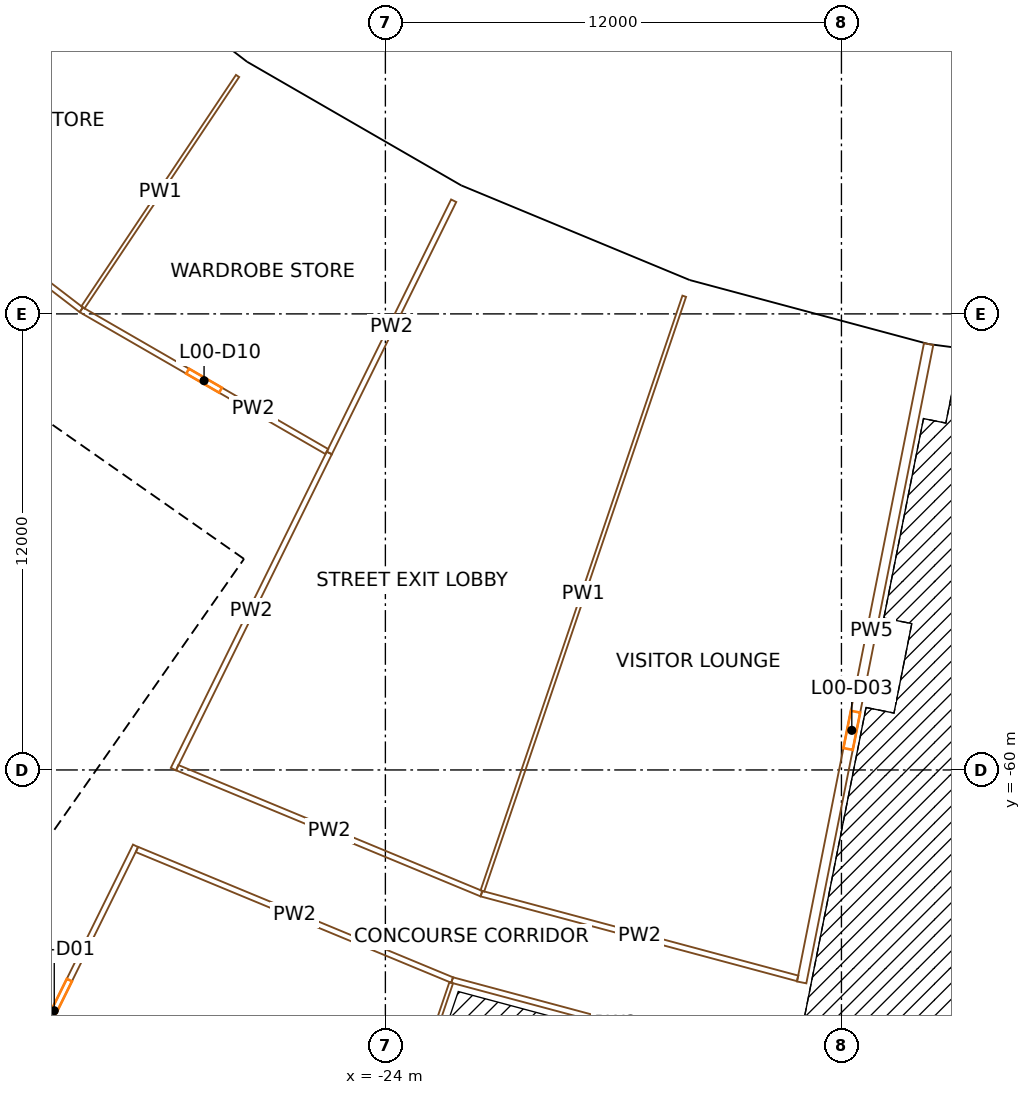
"""IFC4 building model, lengths in metres.
Left out: names, types, materials, properties, quantities, classifications, styles, units other than length and angle.
Written with IfcOpenShell. Run it as: python <this file> out.ifc"""

import sys

from ifc_helpers import new_model, si_unit, direction, frame, frame_2d, origin, origin_2d, place, context, subcontext, project, spatial, rectangle, extrude, element, fill, save


model = new_model("IFC4")
c1 = context("Model", 3, precision=1e-05, world=origin(), true_north=direction((0.0, 1.0)))
c2 = subcontext(c1, "Body", "Model", "MODEL_VIEW")
j1 = project(units=[si_unit("LENGTHUNIT", "METRE"), si_unit("PLANEANGLEUNIT", "RADIAN")], contexts=[c1])
p1 = place(None, origin())
s1 = spatial("IfcSite", under=j1, at=p1, CompositionType="ELEMENT")
p2 = place(p1, origin())
s2 = spatial("IfcBuilding", under=s1, at=p2, CompositionType="ELEMENT")
p3 = place(p2, origin())
s3 = spatial("IfcBuildingStorey", under=s2, at=p3, CompositionType="ELEMENT", Elevation=0.0)
p4 = place(p3, frame((-28.195, -42.197, -0.4), z_axis=(0.0, 0.0, 1.0), x_axis=(0.831469612303, -0.55557023302, 0.0)))
e1 = element("IfcColumn", 1, at=p4, inside=s3, PredefinedType="COLUMN", context=c2, shape_type="SweptSolid", body=[
    extrude(rectangle(XDim=1.1, YDim=1.3, at=origin_2d()), origin(), (0.0, 0.0, 1.0), 9.4),
])
p5 = place(p3, frame((-32.362, -48.433, -0.4), z_axis=(0.0, 0.0, 1.0), x_axis=(0.831469612303, -0.55557023302, 0.0)))
e2 = element("IfcColumn", 2, at=p5, inside=s3, PredefinedType="COLUMN", context=c2, shape_type="SweptSolid", body=[
    extrude(rectangle(XDim=1.4, YDim=1.8, at=origin_2d()), origin(), (0.0, 0.0, 1.0), 9.4),
])
p6 = place(p3, frame((-22.446, -45.516, -0.4), z_axis=(0.0, 0.0, 1.0), x_axis=(0.896872741533, -0.442288690219, 0.0)))
e3 = element("IfcColumn", 3, at=p6, inside=s3, PredefinedType="COLUMN", context=c2, shape_type="SweptSolid", body=[
    extrude(rectangle(XDim=1.1, YDim=1.3, at=origin_2d()), origin(), (0.0, 0.0, 1.0), 9.4),
])
p7 = place(p3, frame((-25.763, -52.243, -0.4), z_axis=(0.0, 0.0, 1.0), x_axis=(0.896872741533, -0.442288690219, 0.0)))
e4 = element("IfcColumn", 4, at=p7, inside=s3, PredefinedType="COLUMN", context=c2, shape_type="SweptSolid", body=[
    extrude(rectangle(XDim=1.4, YDim=1.8, at=origin_2d()), origin(), (0.0, 0.0, 1.0), 9.4),
])
p8 = place(p3, frame((-16.313, -48.057, -0.4), z_axis=(0.0, 0.0, 1.0), x_axis=(0.946930129495, -0.321439465303, 0.0)))
e5 = element("IfcColumn", 5, at=p8, inside=s3, PredefinedType="COLUMN", context=c2, shape_type="SweptSolid", body=[
    extrude(rectangle(XDim=1.1, YDim=1.3, at=origin_2d()), origin(), (0.0, 0.0, 1.0), 9.4),
])
p9 = place(p3, frame((-18.724, -55.159, -0.4), z_axis=(0.0, 0.0, 1.0), x_axis=(0.946930129495, -0.321439465303, 0.0)))
e6 = element("IfcColumn", 6, at=p9, inside=s3, PredefinedType="COLUMN", context=c2, shape_type="SweptSolid", body=[
    extrude(rectangle(XDim=1.4, YDim=1.8, at=origin_2d()), origin(), (0.0, 0.0, 1.0), 9.4),
])
p10 = place(p3, frame((-9.901, -49.775, -0.4), z_axis=(0.0, 0.0, 1.0), x_axis=(0.980785280403, -0.195090322016, 0.0)))
e7 = element("IfcColumn", 7, at=p10, inside=s3, PredefinedType="COLUMN", context=c2, shape_type="SweptSolid", body=[
    extrude(rectangle(XDim=1.1, YDim=1.3, at=origin_2d()), origin(), (0.0, 0.0, 1.0), 9.4),
])
p11 = place(p3, frame((-11.364, -57.131, -0.4), z_axis=(0.0, 0.0, 1.0), x_axis=(0.980785280403, -0.195090322016, 0.0)))
e8 = element("IfcColumn", 8, at=p11, inside=s3, PredefinedType="COLUMN", context=c2, shape_type="SweptSolid", body=[
    extrude(rectangle(XDim=1.4, YDim=1.8, at=origin_2d()), origin(), (0.0, 0.0, 1.0), 9.4),
])
p12 = place(p3, frame((-36.717, -66.337, 0.0), z_axis=(0.0, 0.0, 1.0), x_axis=(0.573577477574, 0.819151315216, 0.0)))
e9 = element("IfcWall", 9, at=p12, inside=s3, PredefinedType="SHEAR", context=c2, shape_type="SweptSolid", body=[
    extrude(rectangle(XDim=14.8, YDim=0.9, at=frame_2d((7.4, 0.0))), origin(), (0.0, 0.0, 1.0), 8.6),
])
p13 = place(p12, frame((6.2, 0.0, 0.0)))
e10 = element("IfcOpeningElement", 10, at=p13, cuts=e9, PredefinedType="OPENING", context=c2, shape_type="SweptSolid", body=[
    extrude(rectangle(XDim=2.4, YDim=2.1, at=frame_2d((1.2, 1.05))), frame((0.0, 0.46, 0.0), z_axis=(0.0, -1.0, 0.0), x_axis=(1.0, 0.0, 0.0)), (0.0, 0.0, 1.0), 0.92),
])
p14 = place(p3, frame((-28.854, -54.324, 0.0), z_axis=(0.0, 0.0, 1.0), x_axis=(-0.819145767589, 0.573585400304, 0.0)))
e11 = element("IfcWall", 11, at=p14, inside=s3, PredefinedType="SHEAR", context=c2, shape_type="SweptSolid", body=[
    extrude(rectangle(XDim=15.045, YDim=0.9, at=frame_2d((7.523, 0.0))), origin(), (0.0, 0.0, 1.0), 8.6),
])
p15 = place(p14, frame((0.85, 0.0, 0.0)))
e12 = element("IfcOpeningElement", 12, at=p15, cuts=e11, PredefinedType="OPENING", context=c2, shape_type="SweptSolid", body=[
    extrude(rectangle(XDim=1.0, YDim=2.1, at=frame_2d((0.5, 1.05))), frame((0.0, 0.46, 0.0), z_axis=(0.0, -1.0, 0.0), x_axis=(1.0, 0.0, 0.0)), (0.0, 0.0, 1.0), 0.92),
])
p16 = place(p14, frame((3.575, 0.0, 0.0)))
e13 = element("IfcOpeningElement", 13, at=p16, cuts=e11, PredefinedType="OPENING", context=c2, shape_type="SweptSolid", body=[
    extrude(rectangle(XDim=1.0, YDim=2.1, at=frame_2d((0.5, 1.05))), frame((0.0, 0.46, 0.0), z_axis=(0.0, -1.0, 0.0), x_axis=(1.0, 0.0, 0.0)), (0.0, 0.0, 1.0), 0.92),
])
p17 = place(p14, frame((6.275, 0.0, 0.0)))
e14 = element("IfcOpeningElement", 14, at=p17, cuts=e11, PredefinedType="OPENING", context=c2, shape_type="SweptSolid", body=[
    extrude(rectangle(XDim=0.9, YDim=2.1, at=frame_2d((0.45, 1.05))), frame((0.0, 0.46, 0.0), z_axis=(0.0, -1.0, 0.0), x_axis=(1.0, 0.0, 0.0)), (0.0, 0.0, 1.0), 0.92),
])
p18 = place(p14, frame((13.495, 0.0, 0.0)))
e15 = element("IfcOpeningElement", 15, at=p18, cuts=e11, PredefinedType="OPENING", context=c2, shape_type="SweptSolid", body=[
    extrude(rectangle(XDim=1.1, YDim=2.1, at=frame_2d((0.55, 1.05))), frame((0.0, 0.46, 0.0), z_axis=(0.0, -1.0, 0.0), x_axis=(1.0, 0.0, 0.0)), (0.0, 0.0, 1.0), 0.92),
])
p19 = place(p3, frame((-31.895, -58.666, 0.0), z_axis=(0.0, 0.0, 1.0), x_axis=(-0.819166993208, 0.573555086491, 0.0)))
e16 = element("IfcWall", 16, at=p19, inside=s3, PredefinedType="SOLIDWALL", context=c2, shape_type="SweptSolid", body=[
    extrude(rectangle(XDim=7.95, YDim=0.3, at=frame_2d((3.975, 0.0))), origin(), (0.0, 0.0, 1.0), 8.6),
])
p20 = place(p19, frame((0.675, 0.0, 0.0)))
e17 = element("IfcOpeningElement", 17, at=p20, cuts=e16, PredefinedType="OPENING", context=c2, shape_type="SweptSolid", body=[
    extrude(rectangle(XDim=1.1, YDim=2.1, at=frame_2d((0.55, 1.05))), frame((0.0, 0.16, 0.0), z_axis=(0.0, -1.0, 0.0), x_axis=(1.0, 0.0, 0.0)), (0.0, 0.0, 1.0), 0.32),
])
p21 = place(p19, frame((3.425, 0.0, 0.0)))
e18 = element("IfcOpeningElement", 18, at=p21, cuts=e16, PredefinedType="OPENING", context=c2, shape_type="SweptSolid", body=[
    extrude(rectangle(XDim=1.1, YDim=2.1, at=frame_2d((0.55, 1.05))), frame((0.0, 0.16, 0.0), z_axis=(0.0, -1.0, 0.0), x_axis=(1.0, 0.0, 0.0)), (0.0, 0.0, 1.0), 0.32),
])
p22 = place(p19, frame((6.175, 0.0, 0.0)))
e19 = element("IfcOpeningElement", 19, at=p22, cuts=e16, PredefinedType="OPENING", context=c2, shape_type="SweptSolid", body=[
    extrude(rectangle(XDim=1.1, YDim=2.1, at=frame_2d((0.55, 1.05))), frame((0.0, 0.16, 0.0), z_axis=(0.0, -1.0, 0.0), x_axis=(1.0, 0.0, 0.0)), (0.0, 0.0, 1.0), 0.32),
])
p23 = place(p3, frame((-30.461, -56.618, 0.0), z_axis=(0.0, 0.0, 1.0), x_axis=(-0.819142461705, 0.573590121456, 0.0)))
e20 = element("IfcWall", 20, at=p23, inside=s3, PredefinedType="SOLIDWALL", context=c2, shape_type="SweptSolid", body=[
    extrude(rectangle(XDim=7.95, YDim=0.3, at=frame_2d((3.975, 0.0))), origin(), (0.0, 0.0, 1.0), 8.6),
])
p24 = place(p3, frame((-33.938, -57.052, 0.0), z_axis=(0.0, 0.0, 1.0), x_axis=(0.573581496053, 0.819148501424, 0.0)))
e21 = element("IfcWall", 21, at=p24, inside=s3, PredefinedType="SOLIDWALL", context=c2, shape_type="SweptSolid", body=[
    extrude(rectangle(XDim=2.2, YDim=0.3, at=frame_2d((1.1, 0.0))), origin(), (0.0, 0.0, 1.0), 8.6),
])
p25 = place(p3, frame((-32.627, -54.917, 0.0), z_axis=(0.0, 0.0, 1.0), x_axis=(0.573507030513, 0.819200638399, 0.0)))
e22 = element("IfcWall", 22, at=p25, inside=s3, PredefinedType="PARTITIONING", context=c2, shape_type="SweptSolid", body=[
    extrude(rectangle(XDim=2.2, YDim=0.15, at=frame_2d((1.1, 0.0))), origin(), (0.0, 0.0, 1.0), 8.6),
])
p26 = place(p3, frame((-27.741, -41.571, 0.0), z_axis=(0.0, 0.0, 1.0), x_axis=(-0.793338838284, 0.608780327927, 0.0)))
e23 = element("IfcWall", 23, at=p26, inside=s3, PredefinedType="SOLIDWALL", context=c2, shape_type="SweptSolid", body=[
    extrude(rectangle(XDim=6.597, YDim=0.45, at=frame_2d((3.298, 0.0))), origin(), (0.0, 0.0, 1.0), 7.7),
])
p27 = place(p26, frame((2.398, 0.0, 0.0)))
e24 = element("IfcOpeningElement", 24, at=p27, cuts=e23, PredefinedType="OPENING", context=c2, shape_type="SweptSolid", body=[
    extrude(rectangle(XDim=1.8, YDim=2.4, at=frame_2d((0.9, 1.2))), frame((0.0, 0.235, 0.0), z_axis=(0.0, -1.0, 0.0), x_axis=(1.0, 0.0, 0.0)), (0.0, 0.0, 1.0), 0.47),
])
p28 = place(p3, frame((-22.155, -44.792, 0.0), z_axis=(0.0, 0.0, 1.0), x_axis=(-0.866022817921, 0.50000447882, 0.0)))
e25 = element("IfcWall", 25, at=p28, inside=s3, PredefinedType="SOLIDWALL", context=c2, shape_type="SweptSolid", body=[
    extrude(rectangle(XDim=6.419, YDim=0.45, at=frame_2d((3.21, 0.0))), origin(), (0.0, 0.0, 1.0), 7.7),
])
p29 = place(p3, frame((-16.078, -47.318, 0.0), z_axis=(0.0, 0.0, 1.0), x_axis=(-0.923877418118, 0.382688536921, 0.0)))
e26 = element("IfcWall", 26, at=p29, inside=s3, PredefinedType="SOLIDWALL", context=c2, shape_type="SweptSolid", body=[
    extrude(rectangle(XDim=6.552, YDim=0.45, at=frame_2d((3.276, 0.0))), origin(), (0.0, 0.0, 1.0), 7.7),
])
p30 = place(p29, frame((2.354, 0.0, 0.0)))
e27 = element("IfcOpeningElement", 27, at=p30, cuts=e26, PredefinedType="OPENING", context=c2, shape_type="SweptSolid", body=[
    extrude(rectangle(XDim=1.8, YDim=2.4, at=frame_2d((0.9, 1.2))), frame((0.0, 0.235, 0.0), z_axis=(0.0, -1.0, 0.0), x_axis=(1.0, 0.0, 0.0)), (0.0, 0.0, 1.0), 0.47),
])
p31 = place(p3, frame((-37.919, -43.352, 0.0), z_axis=(0.0, 0.0, 1.0), x_axis=(0.793353438114, -0.608761301523, 0.0)))
e28 = element("IfcWall", 28, at=p31, inside=s3, PredefinedType="PARTITIONING", context=c2, shape_type="SweptSolid", body=[
    extrude(rectangle(XDim=7.459, YDim=0.15, at=frame_2d((3.73, 0.0))), origin(), (0.0, 0.0, 1.0), 7.6),
])
p32 = place(p3, frame((-32.001, -47.893, 0.0), z_axis=(0.0, 0.0, 1.0), x_axis=(0.866020983744, -0.500007655656, 0.0)))
e29 = element("IfcWall", 29, at=p32, inside=s3, PredefinedType="PARTITIONING", context=c2, shape_type="SweptSolid", body=[
    extrude(rectangle(XDim=7.459, YDim=0.15, at=frame_2d((3.73, 0.0))), origin(), (0.0, 0.0, 1.0), 7.6),
])
p33 = place(p32, frame((3.23, 0.0, 0.0)))
e30 = element("IfcOpeningElement", 30, at=p33, cuts=e29, PredefinedType="OPENING", context=c2, shape_type="SweptSolid", body=[
    extrude(rectangle(XDim=1.0, YDim=2.1, at=frame_2d((0.5, 1.05))), frame((0.0, 0.085, 0.0), z_axis=(0.0, -1.0, 0.0), x_axis=(1.0, 0.0, 0.0)), (0.0, 0.0, 1.0), 0.17),
])
p34 = place(p3, frame((-30.573, -61.996, 0.0), z_axis=(0.0, 0.0, 1.0), x_axis=(-0.442281083907, -0.89687649251, 0.0)))
e31 = element("IfcWall", 31, at=p34, inside=s3, PredefinedType="PARTITIONING", context=c2, shape_type="SweptSolid", body=[
    extrude(rectangle(XDim=9.675, YDim=0.15, at=frame_2d((4.837, 0.0))), origin(), (0.0, 0.0, 1.0), 7.6),
])
p35 = place(p34, frame((3.938, 0.0, 0.0)))
e32 = element("IfcOpeningElement", 32, at=p35, cuts=e31, PredefinedType="OPENING", context=c2, shape_type="SweptSolid", body=[
    extrude(rectangle(XDim=1.8, YDim=2.1, at=frame_2d((0.9, 1.05))), frame((0.0, 0.085, 0.0), z_axis=(0.0, -1.0, 0.0), x_axis=(1.0, 0.0, 0.0)), (0.0, 0.0, 1.0), 0.17),
])
p36 = place(p3, frame((-30.537, -62.092, 0.0), z_axis=(0.0, 0.0, 1.0), x_axis=(0.923877943186, -0.382687269313, 0.0)))
e33 = element("IfcWall", 33, at=p36, inside=s3, PredefinedType="PARTITIONING", context=c2, shape_type="SweptSolid", body=[
    extrude(rectangle(XDim=8.977, YDim=0.15, at=frame_2d((4.488, 0.0))), origin(), (0.0, 0.0, 1.0), 7.6),
])
p37 = place(p3, frame((-29.476, -59.94, 0.0), z_axis=(0.0, 0.0, 1.0), x_axis=(0.923877031545, -0.382689470177, 0.0)))
e34 = element("IfcWall", 34, at=p37, inside=s3, PredefinedType="PARTITIONING", context=c2, shape_type="SweptSolid", body=[
    extrude(rectangle(XDim=8.663, YDim=0.15, at=frame_2d((4.332, 0.0))), origin(), (0.0, 0.0, 1.0), 7.6),
])
p38 = place(p3, frame((-27.66, -81.483, 0.0), z_axis=(0.0, 0.0, 1.0), x_axis=(0.321431987478, 0.946932667842, 0.0)))
e35 = element("IfcWall", 35, at=p38, inside=s3, PredefinedType="PARTITIONING", context=c2, shape_type="SweptSolid", body=[
    extrude(rectangle(XDim=16.774, YDim=0.1, at=frame_2d((8.387, 0.0))), origin(), (0.0, 0.0, 1.0), 7.6),
])
p39 = place(p3, frame((-27.89, -41.74, 0.0), z_axis=(0.0, 0.0, 1.0), x_axis=(-0.555569023768, -0.831470420297, 0.0)))
e36 = element("IfcWall", 36, at=p39, inside=s3, PredefinedType="PARTITIONING", context=c2, shape_type="SweptSolid", body=[
    extrude(rectangle(XDim=7.325, YDim=0.1, at=frame_2d((3.663, 0.0))), origin(), (0.0, 0.0, 1.0), 7.6),
])
p40 = place(p3, frame((-25.476, -51.66, 0.0), z_axis=(0.0, 0.0, 1.0), x_axis=(-0.442300315355, -0.896867008556, 0.0)))
e37 = element("IfcWall", 37, at=p40, inside=s3, PredefinedType="PARTITIONING", context=c2, shape_type="SweptSolid", body=[
    extrude(rectangle(XDim=9.275, YDim=0.15, at=frame_2d((4.637, 0.0))), origin(), (0.0, 0.0, 1.0), 7.6),
])
p41 = place(p3, frame((-22.244, -65.528, 0.0), z_axis=(0.0, 0.0, 1.0), x_axis=(0.965928763412, -0.258808083362, 0.0)))
e38 = element("IfcWall", 38, at=p41, inside=s3, PredefinedType="PARTITIONING", context=c2, shape_type="SweptSolid", body=[
    extrude(rectangle(XDim=8.927, YDim=0.15, at=frame_2d((4.463, 0.0))), origin(), (0.0, 0.0, 1.0), 7.6),
])
p42 = place(p3, frame((-22.203, -45.023, 0.0), z_axis=(0.0, 0.0, 1.0), x_axis=(-0.442284486457, -0.896874814586, 0.0)))
e39 = element("IfcWall", 39, at=p42, inside=s3, PredefinedType="PARTITIONING", context=c2, shape_type="SweptSolid", body=[
    extrude(rectangle(XDim=7.4, YDim=0.15, at=frame_2d((3.7, 0.0))), origin(), (0.0, 0.0, 1.0), 7.6),
])
p43 = place(p3, frame((-21.472, -63.255, 0.0), z_axis=(0.0, 0.0, 1.0), x_axis=(0.96592325157, -0.258828653894, 0.0)))
e40 = element("IfcWall", 40, at=p43, inside=s3, PredefinedType="PARTITIONING", context=c2, shape_type="SweptSolid", body=[
    extrude(rectangle(XDim=8.613, YDim=0.15, at=frame_2d((4.306, 0.0))), origin(), (0.0, 0.0, 1.0), 7.6),
])
p44 = place(p3, frame((-16.136, -47.536, 0.0), z_axis=(0.0, 0.0, 1.0), x_axis=(-0.321439713462, -0.946930045256, 0.0)))
e41 = element("IfcWall", 41, at=p44, inside=s3, PredefinedType="PARTITIONING", context=c2, shape_type="SweptSolid", body=[
    extrude(rectangle(XDim=16.525, YDim=0.1, at=frame_2d((8.262, 0.0))), origin(), (0.0, 0.0, 1.0), 7.6),
])
p45 = place(p3, frame((-13.047, -65.59, 0.0), z_axis=(0.0, 0.0, 1.0), x_axis=(0.195085176221, 0.980786303952, 0.0)))
e42 = element("IfcWall", 42, at=p45, inside=s3, PredefinedType="PARTITIONING", context=c2, shape_type="SweptSolid", body=[
    extrude(rectangle(XDim=17.125, YDim=0.25, at=frame_2d((8.562, 0.0))), origin(), (0.0, 0.0, 1.0), 7.6),
])
p46 = place(p45, frame((6.262, 0.0, 0.0)))
e43 = element("IfcOpeningElement", 43, at=p46, cuts=e42, PredefinedType="OPENING", context=c2, shape_type="SweptSolid", body=[
    extrude(rectangle(XDim=1.0, YDim=2.1, at=frame_2d((0.5, 1.05))), frame((0.0, 0.135, 0.0), z_axis=(0.0, -1.0, 0.0), x_axis=(1.0, 0.0, 0.0)), (0.0, 0.0, 1.0), 0.27),
])
p47 = place(p13, origin())
e44 = element("IfcDoor", 44, at=p47, inside=s3, OperationType="DOUBLE_DOOR_SINGLE_SWING", PredefinedType="DOOR", context=c2, shape_type="SweptSolid", body=[
    extrude(rectangle(XDim=2.4, YDim=2.1, at=frame_2d((1.2, 1.05))), frame((0.0, 0.025, 0.0), z_axis=(0.0, -1.0, 0.0), x_axis=(1.0, 0.0, 0.0)), (0.0, 0.0, 1.0), 0.05),
])
fill(e10, e44)
p48 = place(p20, origin())
e45 = element("IfcDoor", 45, at=p48, inside=s3, OperationType="DOUBLE_DOOR_SLIDING", PredefinedType="DOOR", context=c2, shape_type="SweptSolid", body=[
    extrude(rectangle(XDim=1.1, YDim=2.1, at=frame_2d((0.55, 1.05))), frame((0.0, 0.025, 0.0), z_axis=(0.0, -1.0, 0.0), x_axis=(1.0, 0.0, 0.0)), (0.0, 0.0, 1.0), 0.05),
])
fill(e17, e45)
p49 = place(p15, origin())
e46 = element("IfcDoor", 46, at=p49, inside=s3, OperationType="SINGLE_SWING_LEFT", PredefinedType="DOOR", context=c2, shape_type="SweptSolid", body=[
    extrude(rectangle(XDim=1.0, YDim=2.1, at=frame_2d((0.5, 1.05))), frame((0.0, 0.025, 0.0), z_axis=(0.0, -1.0, 0.0), x_axis=(1.0, 0.0, 0.0)), (0.0, 0.0, 1.0), 0.05),
])
fill(e12, e46)
p50 = place(p16, origin())
e47 = element("IfcDoor", 47, at=p50, inside=s3, OperationType="SINGLE_SWING_RIGHT", PredefinedType="DOOR", context=c2, shape_type="SweptSolid", body=[
    extrude(rectangle(XDim=1.0, YDim=2.1, at=frame_2d((0.5, 1.05))), frame((0.0, 0.025, 0.0), z_axis=(0.0, -1.0, 0.0), x_axis=(1.0, 0.0, 0.0)), (0.0, 0.0, 1.0), 0.05),
])
fill(e13, e47)
p51 = place(p30, origin())
e48 = element("IfcDoor", 48, at=p51, inside=s3, OperationType="DOUBLE_DOOR_DOUBLE_SWING", PredefinedType="DOOR", context=c2, shape_type="SweptSolid", body=[
    extrude(rectangle(XDim=1.8, YDim=2.4, at=frame_2d((0.9, 1.2))), frame((0.0, 0.025, 0.0), z_axis=(0.0, -1.0, 0.0), x_axis=(1.0, 0.0, 0.0)), (0.0, 0.0, 1.0), 0.05),
])
fill(e27, e48)
p52 = place(p35, origin())
e49 = element("IfcDoor", 49, at=p52, inside=s3, OperationType="DOUBLE_DOOR_SINGLE_SWING", PredefinedType="DOOR", context=c2, shape_type="SweptSolid", body=[
    extrude(rectangle(XDim=1.8, YDim=2.1, at=frame_2d((0.9, 1.05))), frame((0.0, 0.025, 0.0), z_axis=(0.0, -1.0, 0.0), x_axis=(1.0, 0.0, 0.0)), (0.0, 0.0, 1.0), 0.05),
])
fill(e32, e49)
p53 = place(p46, origin())
e50 = element("IfcDoor", 50, at=p53, inside=s3, OperationType="SINGLE_SWING_LEFT", PredefinedType="DOOR", context=c2, shape_type="SweptSolid", body=[
    extrude(rectangle(XDim=1.0, YDim=2.1, at=frame_2d((0.5, 1.05))), frame((0.0, 0.025, 0.0), z_axis=(0.0, -1.0, 0.0), x_axis=(1.0, 0.0, 0.0)), (0.0, 0.0, 1.0), 0.05),
])
fill(e43, e50)
p54 = place(p33, origin())
e51 = element("IfcDoor", 51, at=p54, inside=s3, OperationType="SINGLE_SWING_RIGHT", PredefinedType="DOOR", context=c2, shape_type="SweptSolid", body=[
    extrude(rectangle(XDim=1.0, YDim=2.1, at=frame_2d((0.5, 1.05))), frame((0.0, 0.025, 0.0), z_axis=(0.0, -1.0, 0.0), x_axis=(1.0, 0.0, 0.0)), (0.0, 0.0, 1.0), 0.05),
])
fill(e30, e51)
save(model, sys.argv[1])
